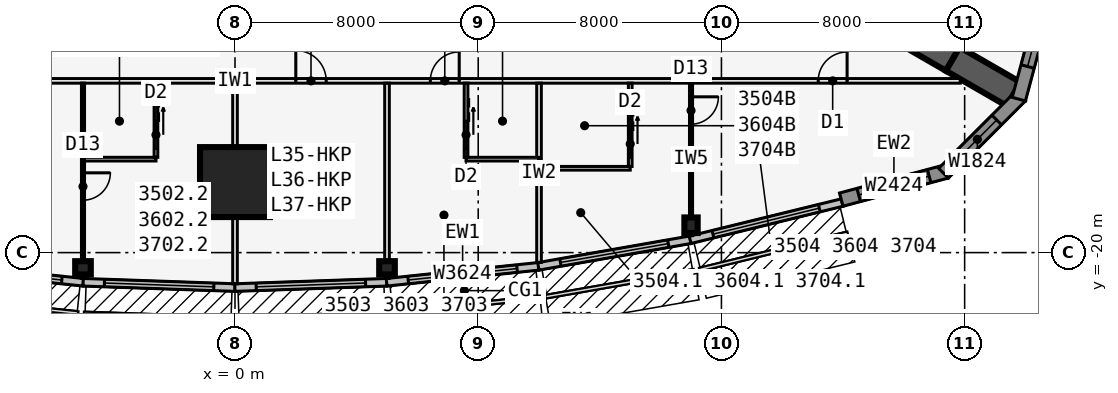
"""IFC4 building model, lengths in metres.
Left out: names, types, materials, properties, quantities, classifications, styles, units other than length and angle.
Written with IfcOpenShell. Run it as: python <this file> out.ifc"""

import sys

from ifc_helpers import new_model, si_unit, direction, frame, frame_2d, origin, origin_2d, place, context, subcontext, project, spatial, polyline, rectangle, i_section, outline, extrude, element, fill, save


model = new_model("IFC4")
c1 = context("Model", 3, precision=1e-05, world=origin(), true_north=direction((0.0, 1.0)))
c2 = subcontext(c1, "Body", "Model", "MODEL_VIEW")
j1 = project(units=[si_unit("LENGTHUNIT", "METRE"), si_unit("PLANEANGLEUNIT", "RADIAN")], contexts=[c1])
p1 = place(None, origin())
s1 = spatial("IfcSite", under=j1, at=p1, CompositionType="ELEMENT")
p2 = place(p1, origin())
s2 = spatial("IfcBuilding", under=s1, at=p2, CompositionType="ELEMENT")
p3 = place(p2, frame((0.0, 0.0, 135.1)))
s3 = spatial("IfcBuildingStorey", under=s2, at=p3, CompositionType="ELEMENT", Elevation=135.1)
for number, where, z_axis, x_axis in (
    (1, (21.61, -12.477, 0.0), (0.0, 0.0, 1.0), (0.866, -0.5, 0.0)),
    (2, (23.61, -13.631, 0.0), (0.0, 0.0, 1.0), (0.866, -0.5, 0.0)),
):
    element("IfcWall", number, at=place(p3, frame(where, z_axis=z_axis, x_axis=x_axis)), inside=s3, PredefinedType="SHEAR", context=c2, shape_type="SweptSolid", body=[
        extrude(rectangle(XDim=2.309, YDim=0.9, at=frame_2d((1.155, 0.0))), origin(), (0.0, 0.0, 1.0), 3.4),
    ])
for number, where, z_axis, x_axis in (
    (3, (-5.0, -20.5, 0.0), (0.0, 0.0, 1.0), (0.0, -1.0, 0.0)),
    (4, (5.0, -20.5, 0.0), (0.0, 0.0, 1.0), (0.0, -1.0, 0.0)),
    (5, (15.0, -19.1, 0.0), (0.0, 0.0, 1.0), (1.0, 0.0, 0.0)),
):
    element("IfcColumn", number, at=place(p3, frame(where, z_axis=z_axis, x_axis=x_axis)), inside=s3, PredefinedType="COLUMN", context=c2, shape_type="SweptSolid", body=[
        extrude(i_section(OverallWidth=0.437, OverallDepth=0.513, WebThickness=0.061, FlangeThickness=0.097, at=origin_2d()), origin(), (0.0, 0.0, 1.0), 3.4),
    ])
p4 = place(p3, frame((0.0, -17.68, 0.0), z_axis=(0.0, 0.0, 1.0), x_axis=(0.0, -1.0, 0.0)))
e6 = element("IfcColumn", 6, at=p4, inside=s3, PredefinedType="COLUMN", context=c2, shape_type="SweptSolid", body=[
    extrude(rectangle(XDim=2.3, YDim=2.3, at=origin_2d()), origin(), (0.0, 0.0, 1.0), 3.4),
])
p5 = place(p3, frame((-9.987, -20.451, 0.0), z_axis=(0.0, 0.0, 1.0), x_axis=(0.994534683851, -0.104406717299, 0.0)))
e7 = element("IfcWall", 7, at=p5, inside=s3, PredefinedType="STANDARD", context=c2, shape_type="SweptSolid", body=[
    extrude(rectangle(XDim=5.028, YDim=0.25, at=frame_2d((2.514, 0.0))), origin(), (0.0, 0.0, 1.0), 3.235),
])
p6 = place(p5, frame((0.714, 0.0, 0.45)))
e8 = element("IfcOpeningElement", 8, at=p6, cuts=e7, PredefinedType="OPENING", context=c2, shape_type="SweptSolid", body=[
    extrude(rectangle(XDim=3.6, YDim=2.4, at=frame_2d((1.8, 1.2))), frame((0.0, 0.135, 0.0), z_axis=(0.0, -1.0, 0.0), x_axis=(1.0, 0.0, 0.0)), (0.0, 0.0, 1.0), 0.27),
])
p7 = place(p3, frame((-4.996, -20.975, 0.0), z_axis=(0.0, 0.0, 1.0), x_axis=(0.999387720943, -0.034988329879, 0.0)))
e9 = element("IfcWall", 9, at=p7, inside=s3, PredefinedType="STANDARD", context=c2, shape_type="SweptSolid", body=[
    extrude(rectangle(XDim=5.003, YDim=0.25, at=frame_2d((2.501, 0.0))), origin(), (0.0, 0.0, 1.0), 3.235),
])
p8 = place(p7, frame((0.701, 0.0, 0.45)))
e10 = element("IfcOpeningElement", 10, at=p8, cuts=e9, PredefinedType="OPENING", context=c2, shape_type="SweptSolid", body=[
    extrude(rectangle(XDim=3.6, YDim=2.4, at=frame_2d((1.8, 1.2))), frame((0.0, 0.135, 0.0), z_axis=(0.0, -1.0, 0.0), x_axis=(1.0, 0.0, 0.0)), (0.0, 0.0, 1.0), 0.27),
])
p9 = place(p3, frame((-0.004, -21.15, 0.0), z_axis=(0.0, 0.0, 1.0), x_axis=(0.999387720943, 0.034988329879, 0.0)))
e11 = element("IfcWall", 11, at=p9, inside=s3, PredefinedType="STANDARD", context=c2, shape_type="SweptSolid", body=[
    extrude(rectangle(XDim=5.003, YDim=0.25, at=frame_2d((2.501, 0.0))), origin(), (0.0, 0.0, 1.0), 3.235),
])
p10 = place(p9, frame((0.701, 0.0, 0.45)))
e12 = element("IfcOpeningElement", 12, at=p10, cuts=e11, PredefinedType="OPENING", context=c2, shape_type="SweptSolid", body=[
    extrude(rectangle(XDim=3.6, YDim=2.4, at=frame_2d((1.8, 1.2))), frame((0.0, 0.135, 0.0), z_axis=(0.0, -1.0, 0.0), x_axis=(1.0, 0.0, 0.0)), (0.0, 0.0, 1.0), 0.27),
])
p11 = place(p3, frame((4.987, -20.976, 0.0), z_axis=(0.0, 0.0, 1.0), x_axis=(0.994534683851, 0.104406717299, 0.0)))
e13 = element("IfcWall", 13, at=p11, inside=s3, PredefinedType="STANDARD", context=c2, shape_type="SweptSolid", body=[
    extrude(rectangle(XDim=5.028, YDim=0.25, at=frame_2d((2.514, 0.0))), origin(), (0.0, 0.0, 1.0), 3.235),
])
p12 = place(p11, frame((0.714, 0.0, 0.45)))
e14 = element("IfcOpeningElement", 14, at=p12, cuts=e13, PredefinedType="OPENING", context=c2, shape_type="SweptSolid", body=[
    extrude(rectangle(XDim=3.6, YDim=2.4, at=frame_2d((1.8, 1.2))), frame((0.0, 0.135, 0.0), z_axis=(0.0, -1.0, 0.0), x_axis=(1.0, 0.0, 0.0)), (0.0, 0.0, 1.0), 0.27),
])
p13 = place(p3, frame((9.979, -20.452, 0.0), z_axis=(0.0, 0.0, 1.0), x_axis=(0.985030467156, 0.172380331752, 0.0)))
e15 = element("IfcWall", 15, at=p13, inside=s3, PredefinedType="STANDARD", context=c2, shape_type="SweptSolid", body=[
    extrude(rectangle(XDim=5.076, YDim=0.25, at=frame_2d((2.538, 0.0))), origin(), (0.0, 0.0, 1.0), 3.235),
])
p14 = place(p13, frame((0.738, 0.0, 0.45)))
e16 = element("IfcOpeningElement", 16, at=p14, cuts=e15, PredefinedType="OPENING", context=c2, shape_type="SweptSolid", body=[
    extrude(rectangle(XDim=3.6, YDim=2.4, at=frame_2d((1.8, 1.2))), frame((0.0, 0.135, 0.0), z_axis=(0.0, -1.0, 0.0), x_axis=(1.0, 0.0, 0.0)), (0.0, 0.0, 1.0), 0.27),
])
p15 = place(p3, frame((14.97, -19.579, 0.0), z_axis=(0.0, 0.0, 1.0), x_axis=(0.971270024053, 0.237980126011, 0.0)))
e17 = element("IfcWall", 17, at=p15, inside=s3, PredefinedType="STANDARD", context=c2, shape_type="SweptSolid", body=[
    extrude(rectangle(XDim=5.148, YDim=0.25, at=frame_2d((2.574, 0.0))), origin(), (0.0, 0.0, 1.0), 3.235),
])
p16 = place(p15, frame((0.774, 0.0, 0.45)))
e18 = element("IfcOpeningElement", 18, at=p16, cuts=e17, PredefinedType="OPENING", context=c2, shape_type="SweptSolid", body=[
    extrude(rectangle(XDim=3.6, YDim=2.4, at=frame_2d((1.8, 1.2))), frame((0.0, 0.135, 0.0), z_axis=(0.0, -1.0, 0.0), x_axis=(1.0, 0.0, 0.0)), (0.0, 0.0, 1.0), 0.27),
])
p17 = place(p3, frame((19.942, -18.258, 0.0), z_axis=(0.0, 0.0, 1.0), x_axis=(0.965924653531, 0.258823421857, 0.0)))
e19 = element("IfcWall", 19, at=p17, inside=s3, PredefinedType="SOLIDWALL", context=c2, shape_type="SweptSolid", body=[
    extrude(rectangle(XDim=3.586, YDim=0.45, at=frame_2d((1.793, 0.0))), origin(), (0.0, 0.0, 1.0), 3.235),
])
p18 = place(p17, frame((0.593, 0.0, 0.45)))
e20 = element("IfcOpeningElement", 20, at=p18, cuts=e19, PredefinedType="OPENING", context=c2, shape_type="SweptSolid", body=[
    extrude(rectangle(XDim=2.4, YDim=2.4, at=frame_2d((1.2, 1.2))), frame((0.0, 0.235, 0.0), z_axis=(0.0, -1.0, 0.0), x_axis=(1.0, 0.0, 0.0)), (0.0, 0.0, 1.0), 0.47),
])
p19 = place(p3, frame((23.305, -17.388, 0.0), z_axis=(0.0, 0.0, 1.0), x_axis=(0.707106781187, 0.707106781187, 0.0)))
e21 = element("IfcWall", 21, at=p19, inside=s3, PredefinedType="SOLIDWALL", context=c2, shape_type="SweptSolid", body=[
    extrude(outline(polyline([(3.586, 0.225), (3.527, 0.225), (3.035, 0.093), (3.0, 0.225), (0.0, 0.225), (0.0, -0.225), (3.586, -0.225), (3.586, 0.225)])), origin(), (0.0, 0.0, 1.0), 3.235),
])
p20 = place(p19, frame((0.675, 0.0, 0.45)))
e22 = element("IfcOpeningElement", 22, at=p20, cuts=e21, PredefinedType="OPENING", context=c2, shape_type="SweptSolid", body=[
    extrude(rectangle(XDim=1.8, YDim=2.4, at=frame_2d((0.9, 1.2))), frame((0.0, 0.235, 0.0), z_axis=(0.0, -1.0, 0.0), x_axis=(1.0, 0.0, 0.0)), (0.0, 0.0, 1.0), 0.47),
])
p21 = place(p3, frame((25.783, -14.953, 0.0), z_axis=(0.0, 0.0, 1.0), x_axis=(0.258823421857, 0.965924653531, 0.0)))
e23 = element("IfcWall", 23, at=p21, inside=s3, PredefinedType="SOLIDWALL", context=c2, shape_type="SweptSolid", body=[
    extrude(outline(polyline([(3.586, 0.225), (0.586, 0.225), (0.551, 0.093), (0.06, 0.225), (0.0, 0.225), (0.0, -0.225), (3.586, -0.225), (3.586, 0.225)])), origin(), (0.0, 0.0, 1.0), 3.235),
])
p22 = place(p21, frame((1.111, 0.0, 0.45)))
e24 = element("IfcOpeningElement", 24, at=p22, cuts=e23, PredefinedType="OPENING", context=c2, shape_type="SweptSolid", body=[
    extrude(rectangle(XDim=1.8, YDim=2.4, at=frame_2d((0.9, 1.2))), frame((0.0, 0.235, 0.0), z_axis=(0.0, -1.0, 0.0), x_axis=(1.0, 0.0, 0.0)), (0.0, 0.0, 1.0), 0.47),
])
p23 = place(p3, frame((-23.857, -14.351, 0.0), z_axis=(0.0, 0.0, 1.0), x_axis=(1.0, 0.0, 0.0)))
e25 = element("IfcWall", 25, at=p23, inside=s3, PredefinedType="PARTITIONING", context=c2, shape_type="SweptSolid", body=[
    extrude(rectangle(XDim=47.714, YDim=0.15, at=frame_2d((23.857, 0.0))), origin(), (0.0, 0.0, 1.0), 3.235),
])
p24 = place(p23, frame((4.682, 0.0, 0.0)))
e26 = element("IfcOpeningElement", 26, at=p24, cuts=e25, PredefinedType="OPENING", context=c2, shape_type="SweptSolid", body=[
    extrude(rectangle(XDim=0.95, YDim=2.13, at=frame_2d((0.475, 1.065))), frame((0.0, 0.085, 0.0), z_axis=(0.0, -1.0, 0.0), x_axis=(1.0, 0.0, 0.0)), (0.0, 0.0, 1.0), 0.17),
])
p25 = place(p23, frame((15.882, 0.0, 0.0)))
e27 = element("IfcOpeningElement", 27, at=p25, cuts=e25, PredefinedType="OPENING", context=c2, shape_type="SweptSolid", body=[
    extrude(rectangle(XDim=0.95, YDim=2.13, at=frame_2d((0.475, 1.065))), frame((0.0, 0.085, 0.0), z_axis=(0.0, -1.0, 0.0), x_axis=(1.0, 0.0, 0.0)), (0.0, 0.0, 1.0), 0.17),
])
p26 = place(p23, frame((25.857, 0.0, 0.0)))
e28 = element("IfcOpeningElement", 28, at=p26, cuts=e25, PredefinedType="OPENING", context=c2, shape_type="SweptSolid", body=[
    extrude(rectangle(XDim=1.0, YDim=2.13, at=frame_2d((0.5, 1.065))), frame((0.0, 0.085, 0.0), z_axis=(0.0, -1.0, 0.0), x_axis=(1.0, 0.0, 0.0)), (0.0, 0.0, 1.0), 0.17),
])
p27 = place(p23, frame((30.282, 0.0, 0.0)))
e29 = element("IfcOpeningElement", 29, at=p27, cuts=e25, PredefinedType="OPENING", context=c2, shape_type="SweptSolid", body=[
    extrude(rectangle(XDim=0.95, YDim=2.13, at=frame_2d((0.475, 1.065))), frame((0.0, 0.085, 0.0), z_axis=(0.0, -1.0, 0.0), x_axis=(1.0, 0.0, 0.0)), (0.0, 0.0, 1.0), 0.17),
])
p28 = place(p23, frame((43.041, 0.0, 0.0)))
e30 = element("IfcOpeningElement", 30, at=p28, cuts=e25, PredefinedType="OPENING", context=c2, shape_type="SweptSolid", body=[
    extrude(rectangle(XDim=0.95, YDim=2.13, at=frame_2d((0.475, 1.065))), frame((0.0, 0.085, 0.0), z_axis=(0.0, -1.0, 0.0), x_axis=(1.0, 0.0, 0.0)), (0.0, 0.0, 1.0), 0.17),
])
p29 = place(p3, frame((-5.0, -14.426, 0.0), z_axis=(0.0, 0.0, 1.0), x_axis=(0.0, -1.0, 0.0)))
e31 = element("IfcWall", 31, at=p29, inside=s3, PredefinedType="PARTITIONING", context=c2, shape_type="SweptSolid", body=[
    extrude(rectangle(XDim=6.423, YDim=0.1, at=frame_2d((3.211, 0.0))), origin(), (0.0, 0.0, 1.0), 2.389),
])
p30 = place(p29, frame((2.95, 0.0, 0.0)))
e32 = element("IfcOpeningElement", 32, at=p30, cuts=e31, PredefinedType="OPENING", context=c2, shape_type="SweptSolid", body=[
    extrude(rectangle(XDim=0.9, YDim=2.13, at=frame_2d((0.45, 1.065))), frame((0.0, 0.06, 0.0), z_axis=(0.0, -1.0, 0.0), x_axis=(1.0, 0.0, 0.0)), (0.0, 0.0, 1.0), 0.12),
])
p31 = place(p3, frame((0.0, -14.426, 0.0), z_axis=(0.0, 0.0, 1.0), x_axis=(0.0, -1.0, 0.0)))
e33 = element("IfcWall", 33, at=p31, inside=s3, PredefinedType="PARTITIONING", context=c2, shape_type="SweptSolid", body=[
    extrude(rectangle(XDim=6.599, YDim=0.15, at=frame_2d((3.299, 0.0))), origin(), (0.0, 0.0, 1.0), 2.389),
])
p32 = place(p3, frame((5.0, -14.426, 0.0), z_axis=(0.0, 0.0, 1.0), x_axis=(0.0, -1.0, 0.0)))
e34 = element("IfcWall", 34, at=p32, inside=s3, PredefinedType="PARTITIONING", context=c2, shape_type="SweptSolid", body=[
    extrude(rectangle(XDim=6.423, YDim=0.15, at=frame_2d((3.211, 0.0))), origin(), (0.0, 0.0, 1.0), 2.389),
])
p33 = place(p3, frame((10.0, -14.426, 0.0), z_axis=(0.0, 0.0, 1.0), x_axis=(0.0, -1.0, 0.0)))
e35 = element("IfcWall", 35, at=p33, inside=s3, PredefinedType="PARTITIONING", context=c2, shape_type="SweptSolid", body=[
    extrude(rectangle(XDim=5.895, YDim=0.15, at=frame_2d((2.948, 0.0))), origin(), (0.0, 0.0, 1.0), 2.389),
])
p34 = place(p3, frame((15.0, -14.426, 0.0), z_axis=(0.0, 0.0, 1.0), x_axis=(0.0, -1.0, 0.0)))
e36 = element("IfcWall", 36, at=p34, inside=s3, PredefinedType="PARTITIONING", context=c2, shape_type="SweptSolid", body=[
    extrude(rectangle(XDim=5.017, YDim=0.1, at=frame_2d((2.508, 0.0))), origin(), (0.0, 0.0, 1.0), 2.389),
])
p35 = place(p34, frame((0.45, 0.0, 0.0)))
e37 = element("IfcOpeningElement", 37, at=p35, cuts=e36, PredefinedType="OPENING", context=c2, shape_type="SweptSolid", body=[
    extrude(rectangle(XDim=0.9, YDim=2.13, at=frame_2d((0.45, 1.065))), frame((0.0, 0.06, 0.0), z_axis=(0.0, -1.0, 0.0), x_axis=(1.0, 0.0, 0.0)), (0.0, 0.0, 1.0), 0.12),
])
p36 = place(p3, frame((-5.0, -16.926, 0.0), z_axis=(0.0, 0.0, 1.0), x_axis=(1.0, 0.0, 0.0)))
e38 = element("IfcWall", 38, at=p36, inside=s3, PredefinedType="PLUMBINGWALL", context=c2, shape_type="SweptSolid", body=[
    extrude(rectangle(XDim=2.4, YDim=0.12, at=frame_2d((1.2, 0.0))), origin(), (0.0, 0.0, 1.0), 3.235),
])
p37 = place(p3, frame((-2.6, -14.426, 0.0), z_axis=(0.0, 0.0, 1.0), x_axis=(0.0, -1.0, 0.0)))
e39 = element("IfcWall", 39, at=p37, inside=s3, PredefinedType="PLUMBINGWALL", context=c2, shape_type="SweptSolid", body=[
    extrude(rectangle(XDim=2.44, YDim=0.12, at=frame_2d((1.22, 0.0))), origin(), (0.0, 0.0, 1.0), 3.235),
])
p38 = place(p37, frame((1.25, 0.0, 0.0)))
e40 = element("IfcOpeningElement", 40, at=p38, cuts=e39, PredefinedType="OPENING", context=c2, shape_type="SweptSolid", body=[
    extrude(rectangle(XDim=0.9, YDim=2.13, at=frame_2d((0.45, 1.065))), frame((0.0, 0.07, 0.0), z_axis=(0.0, -1.0, 0.0), x_axis=(1.0, 0.0, 0.0)), (0.0, 0.0, 1.0), 0.14),
])
p39 = place(p3, frame((7.6, -16.926, 0.0), z_axis=(0.0, 0.0, 1.0), x_axis=(1.0, 0.0, 0.0)))
e41 = element("IfcWall", 41, at=p39, inside=s3, PredefinedType="PLUMBINGWALL", context=c2, shape_type="SweptSolid", body=[
    extrude(rectangle(XDim=2.4, YDim=0.12, at=frame_2d((1.2, 0.0))), origin(), (0.0, 0.0, 1.0), 3.235),
])
p40 = place(p3, frame((7.6, -14.426, 0.0), z_axis=(0.0, 0.0, 1.0), x_axis=(0.0, -1.0, 0.0)))
e42 = element("IfcWall", 42, at=p40, inside=s3, PredefinedType="PLUMBINGWALL", context=c2, shape_type="SweptSolid", body=[
    extrude(rectangle(XDim=2.44, YDim=0.12, at=frame_2d((1.22, 0.0))), origin(), (0.0, 0.0, 1.0), 3.235),
])
p41 = place(p40, frame((1.25, 0.0, 0.0)))
e43 = element("IfcOpeningElement", 43, at=p41, cuts=e42, PredefinedType="OPENING", context=c2, shape_type="SweptSolid", body=[
    extrude(rectangle(XDim=0.9, YDim=2.13, at=frame_2d((0.45, 1.065))), frame((0.0, 0.07, 0.0), z_axis=(0.0, -1.0, 0.0), x_axis=(1.0, 0.0, 0.0)), (0.0, 0.0, 1.0), 0.14),
])
p42 = place(p3, frame((10.0, -17.226, 0.0), z_axis=(0.0, 0.0, 1.0), x_axis=(1.0, 0.0, 0.0)))
e44 = element("IfcWall", 44, at=p42, inside=s3, PredefinedType="PLUMBINGWALL", context=c2, shape_type="SweptSolid", body=[
    extrude(rectangle(XDim=3.0, YDim=0.12, at=frame_2d((1.5, 0.0))), origin(), (0.0, 0.0, 1.0), 3.235),
])
p43 = place(p3, frame((13.0, -14.426, 0.0), z_axis=(0.0, 0.0, 1.0), x_axis=(0.0, -1.0, 0.0)))
e45 = element("IfcWall", 45, at=p43, inside=s3, PredefinedType="PLUMBINGWALL", context=c2, shape_type="SweptSolid", body=[
    extrude(rectangle(XDim=2.74, YDim=0.12, at=frame_2d((1.37, 0.0))), origin(), (0.0, 0.0, 1.0), 3.235),
])
p44 = place(p43, frame((1.55, 0.0, 0.0)))
e46 = element("IfcOpeningElement", 46, at=p44, cuts=e45, PredefinedType="OPENING", context=c2, shape_type="SweptSolid", body=[
    extrude(rectangle(XDim=0.9, YDim=2.13, at=frame_2d((0.45, 1.065))), frame((0.0, 0.07, 0.0), z_axis=(0.0, -1.0, 0.0), x_axis=(1.0, 0.0, 0.0)), (0.0, 0.0, 1.0), 0.14),
])
p45 = place(p6, origin())
e47 = element("IfcWindow", 47, at=p45, inside=s3, PartitioningType="SINGLE_PANEL", PredefinedType="WINDOW", context=c2, shape_type="SweptSolid", body=[
    extrude(rectangle(XDim=3.6, YDim=2.4, at=frame_2d((1.8, 1.2))), frame((0.0, 0.03, 0.0), z_axis=(0.0, -1.0, 0.0), x_axis=(1.0, 0.0, 0.0)), (0.0, 0.0, 1.0), 0.06),
])
fill(e8, e47)
p46 = place(p8, origin())
e48 = element("IfcWindow", 48, at=p46, inside=s3, PartitioningType="SINGLE_PANEL", PredefinedType="WINDOW", context=c2, shape_type="SweptSolid", body=[
    extrude(rectangle(XDim=3.6, YDim=2.4, at=frame_2d((1.8, 1.2))), frame((0.0, 0.03, 0.0), z_axis=(0.0, -1.0, 0.0), x_axis=(1.0, 0.0, 0.0)), (0.0, 0.0, 1.0), 0.06),
])
fill(e10, e48)
p47 = place(p10, origin())
e49 = element("IfcWindow", 49, at=p47, inside=s3, PartitioningType="SINGLE_PANEL", PredefinedType="WINDOW", context=c2, shape_type="SweptSolid", body=[
    extrude(rectangle(XDim=3.6, YDim=2.4, at=frame_2d((1.8, 1.2))), frame((0.0, 0.03, 0.0), z_axis=(0.0, -1.0, 0.0), x_axis=(1.0, 0.0, 0.0)), (0.0, 0.0, 1.0), 0.06),
])
fill(e12, e49)
p48 = place(p12, origin())
e50 = element("IfcWindow", 50, at=p48, inside=s3, PartitioningType="SINGLE_PANEL", PredefinedType="WINDOW", context=c2, shape_type="SweptSolid", body=[
    extrude(rectangle(XDim=3.6, YDim=2.4, at=frame_2d((1.8, 1.2))), frame((0.0, 0.03, 0.0), z_axis=(0.0, -1.0, 0.0), x_axis=(1.0, 0.0, 0.0)), (0.0, 0.0, 1.0), 0.06),
])
fill(e14, e50)
p49 = place(p14, origin())
e51 = element("IfcWindow", 51, at=p49, inside=s3, PartitioningType="SINGLE_PANEL", PredefinedType="WINDOW", context=c2, shape_type="SweptSolid", body=[
    extrude(rectangle(XDim=3.6, YDim=2.4, at=frame_2d((1.8, 1.2))), frame((0.0, 0.03, 0.0), z_axis=(0.0, -1.0, 0.0), x_axis=(1.0, 0.0, 0.0)), (0.0, 0.0, 1.0), 0.06),
])
fill(e16, e51)
p50 = place(p16, origin())
e52 = element("IfcWindow", 52, at=p50, inside=s3, PartitioningType="SINGLE_PANEL", PredefinedType="WINDOW", context=c2, shape_type="SweptSolid", body=[
    extrude(rectangle(XDim=3.6, YDim=2.4, at=frame_2d((1.8, 1.2))), frame((0.0, 0.03, 0.0), z_axis=(0.0, -1.0, 0.0), x_axis=(1.0, 0.0, 0.0)), (0.0, 0.0, 1.0), 0.06),
])
fill(e18, e52)
p51 = place(p18, origin())
e53 = element("IfcWindow", 53, at=p51, inside=s3, PartitioningType="SINGLE_PANEL", PredefinedType="WINDOW", context=c2, shape_type="SweptSolid", body=[
    extrude(rectangle(XDim=2.4, YDim=2.4, at=frame_2d((1.2, 1.2))), frame((0.0, 0.03, 0.0), z_axis=(0.0, -1.0, 0.0), x_axis=(1.0, 0.0, 0.0)), (0.0, 0.0, 1.0), 0.06),
])
fill(e20, e53)
p52 = place(p20, origin())
e54 = element("IfcWindow", 54, at=p52, inside=s3, PartitioningType="SINGLE_PANEL", PredefinedType="WINDOW", context=c2, shape_type="SweptSolid", body=[
    extrude(rectangle(XDim=1.8, YDim=2.4, at=frame_2d((0.9, 1.2))), frame((0.0, 0.03, 0.0), z_axis=(0.0, -1.0, 0.0), x_axis=(1.0, 0.0, 0.0)), (0.0, 0.0, 1.0), 0.06),
])
fill(e22, e54)
p53 = place(p22, origin())
e55 = element("IfcWindow", 55, at=p53, inside=s3, PartitioningType="SINGLE_PANEL", PredefinedType="WINDOW", context=c2, shape_type="SweptSolid", body=[
    extrude(rectangle(XDim=1.8, YDim=2.4, at=frame_2d((0.9, 1.2))), frame((0.0, 0.03, 0.0), z_axis=(0.0, -1.0, 0.0), x_axis=(1.0, 0.0, 0.0)), (0.0, 0.0, 1.0), 0.06),
])
fill(e24, e55)
p54 = place(p30, origin())
e56 = element("IfcDoor", 56, at=p54, inside=s3, OperationType="SINGLE_SWING_LEFT", PredefinedType="DOOR", context=c2, shape_type="SweptSolid", body=[
    extrude(rectangle(XDim=0.9, YDim=2.13, at=frame_2d((0.45, 1.065))), frame((0.0, 0.025, 0.0), z_axis=(0.0, -1.0, 0.0), x_axis=(1.0, 0.0, 0.0)), (0.0, 0.0, 1.0), 0.05),
])
fill(e32, e56)
p55 = place(p35, origin())
e57 = element("IfcDoor", 57, at=p55, inside=s3, OperationType="SINGLE_SWING_LEFT", PredefinedType="DOOR", context=c2, shape_type="SweptSolid", body=[
    extrude(rectangle(XDim=0.9, YDim=2.13, at=frame_2d((0.45, 1.065))), frame((0.0, 0.025, 0.0), z_axis=(0.0, -1.0, 0.0), x_axis=(1.0, 0.0, 0.0)), (0.0, 0.0, 1.0), 0.05),
])
fill(e37, e57)
p56 = place(p38, origin())
e58 = element("IfcDoor", 58, at=p56, inside=s3, OperationType="SLIDING_TO_LEFT", PredefinedType="DOOR", context=c2, shape_type="SweptSolid", body=[
    extrude(rectangle(XDim=0.9, YDim=2.13, at=frame_2d((0.45, 1.065))), frame((0.0, 0.025, 0.0), z_axis=(0.0, -1.0, 0.0), x_axis=(1.0, 0.0, 0.0)), (0.0, 0.0, 1.0), 0.05),
])
fill(e40, e58)
p57 = place(p26, origin())
e59 = element("IfcDoor", 59, at=p57, inside=s3, OperationType="SINGLE_SWING_LEFT", PredefinedType="DOOR", context=c2, shape_type="SweptSolid", body=[
    extrude(rectangle(XDim=1.0, YDim=2.13, at=frame_2d((0.5, 1.065))), frame((0.0, 0.025, 0.0), z_axis=(0.0, -1.0, 0.0), x_axis=(1.0, 0.0, 0.0)), (0.0, 0.0, 1.0), 0.05),
])
fill(e28, e59)
p58 = place(p41, origin())
e60 = element("IfcDoor", 60, at=p58, inside=s3, OperationType="SLIDING_TO_LEFT", PredefinedType="DOOR", context=c2, shape_type="SweptSolid", body=[
    extrude(rectangle(XDim=0.9, YDim=2.13, at=frame_2d((0.45, 1.065))), frame((0.0, 0.025, 0.0), z_axis=(0.0, -1.0, 0.0), x_axis=(1.0, 0.0, 0.0)), (0.0, 0.0, 1.0), 0.05),
])
fill(e43, e60)
p59 = place(p27, origin())
e61 = element("IfcDoor", 61, at=p59, inside=s3, OperationType="SINGLE_SWING_RIGHT", PredefinedType="DOOR", context=c2, shape_type="SweptSolid", body=[
    extrude(rectangle(XDim=0.95, YDim=2.13, at=frame_2d((0.475, 1.065))), frame((0.0, 0.025, 0.0), z_axis=(0.0, -1.0, 0.0), x_axis=(1.0, 0.0, 0.0)), (0.0, 0.0, 1.0), 0.05),
])
fill(e29, e61)
p60 = place(p44, origin())
e62 = element("IfcDoor", 62, at=p60, inside=s3, OperationType="SLIDING_TO_LEFT", PredefinedType="DOOR", context=c2, shape_type="SweptSolid", body=[
    extrude(rectangle(XDim=0.9, YDim=2.13, at=frame_2d((0.45, 1.065))), frame((0.0, 0.025, 0.0), z_axis=(0.0, -1.0, 0.0), x_axis=(1.0, 0.0, 0.0)), (0.0, 0.0, 1.0), 0.05),
])
fill(e46, e62)
p61 = place(p28, origin())
e63 = element("IfcDoor", 63, at=p61, inside=s3, OperationType="SINGLE_SWING_RIGHT", PredefinedType="DOOR", context=c2, shape_type="SweptSolid", body=[
    extrude(rectangle(XDim=0.95, YDim=2.13, at=frame_2d((0.475, 1.065))), frame((0.0, 0.025, 0.0), z_axis=(0.0, -1.0, 0.0), x_axis=(1.0, 0.0, 0.0)), (0.0, 0.0, 1.0), 0.05),
])
fill(e30, e63)
save(model, sys.argv[1])
